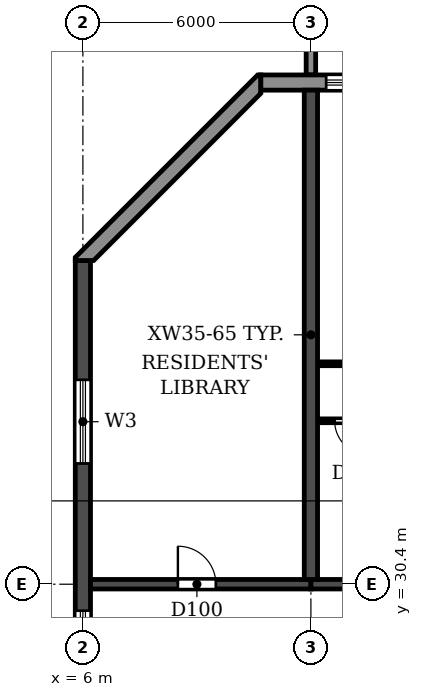
"""IFC4 building model, lengths in metres.
Left out: names, types, materials, properties, quantities, classifications, styles, units other than length and angle.
Written with IfcOpenShell. Run it as: python <this file> out.ifc"""

import sys

from ifc_helpers import new_model, si_unit, direction, frame, frame_2d, origin, place, context, subcontext, project, spatial, polyline, rectangle, outline, extrude, source, transform, mapped, element, fill, save


model = new_model("IFC4")
c1 = context("Model", 3, precision=1e-05, world=origin(), true_north=direction((0.0, 1.0)))
c2 = subcontext(c1, "Body", "Model", "MODEL_VIEW")
j1 = project(units=[si_unit("LENGTHUNIT", "METRE"), si_unit("PLANEANGLEUNIT", "RADIAN")], contexts=[c1])
p1 = place(None, origin())
s1 = spatial("IfcSite", under=j1, at=p1, CompositionType="ELEMENT")
p2 = place(p1, origin())
s2 = spatial("IfcBuilding", under=s1, at=p2, CompositionType="ELEMENT")
p3 = place(p2, frame((0.0, 0.0, 92.7)))
s3 = spatial("IfcBuildingStorey", under=s2, at=p3, CompositionType="ELEMENT", Elevation=92.7)
p4 = place(p3, frame((12.0, 30.525, 0.0), z_axis=(0.0, 0.0, 1.0), x_axis=(0.0, 1.0, 0.0)))
e1 = element("IfcWall", 1, at=p4, inside=s3, PredefinedType="SHEAR", context=c2, shape_type="SweptSolid", body=[
    extrude(rectangle(XDim=12.875, YDim=0.35, at=frame_2d((6.438, 0.0))), origin(), (0.0, 0.0, 1.0), 3.06),
])
p5 = place(p3, frame((6.0, 4.683, 0.0), z_axis=(0.0, 0.0, 1.0), x_axis=(0.0, 1.0, 0.0)))
e2 = element("IfcWall", 2, at=p5, inside=s3, PredefinedType="SHEAR", context=c2, shape_type="SweptSolid", body=[
    extrude(rectangle(XDim=34.234, YDim=0.4, at=frame_2d((17.117, 0.0))), origin(), (0.0, 0.0, 1.0), 3.06),
])
p6 = place(p5, frame((23.817, 0.0, 0.9)))
e3 = element("IfcOpeningElement", 3, at=p6, cuts=e2, PredefinedType="OPENING", context=c2, shape_type="SweptSolid", body=[
    extrude(rectangle(XDim=1.2, YDim=1.5, at=frame_2d((0.6, 0.75))), frame((0.0, 0.21, 0.0), z_axis=(0.0, -1.0, 0.0), x_axis=(1.0, 0.0, 0.0)), (0.0, 0.0, 1.0), 0.42),
])
p7 = place(p5, frame((8.017, 0.0, 0.9)))
e4 = element("IfcOpeningElement", 4, at=p7, cuts=e2, PredefinedType="OPENING", context=c2, shape_type="SweptSolid", body=[
    extrude(rectangle(XDim=1.2, YDim=1.5, at=frame_2d((0.6, 0.75))), frame((0.0, 0.21, 0.0), z_axis=(0.0, -1.0, 0.0), x_axis=(1.0, 0.0, 0.0)), (0.0, 0.0, 1.0), 0.42),
])
p8 = place(p5, frame((15.917, 0.0, 0.9)))
e5 = element("IfcOpeningElement", 5, at=p8, cuts=e2, PredefinedType="OPENING", context=c2, shape_type="SweptSolid", body=[
    extrude(rectangle(XDim=1.2, YDim=1.5, at=frame_2d((0.6, 0.75))), frame((0.0, 0.21, 0.0), z_axis=(0.0, -1.0, 0.0), x_axis=(1.0, 0.0, 0.0)), (0.0, 0.0, 1.0), 0.42),
])
p9 = place(p5, frame((28.894, 0.0, 0.6)))
e6 = element("IfcOpeningElement", 6, at=p9, cuts=e2, PredefinedType="OPENING", context=c2, shape_type="SweptSolid", body=[
    extrude(rectangle(XDim=2.2, YDim=1.8, at=frame_2d((1.1, 0.9))), frame((0.0, 0.21, 0.0), z_axis=(0.0, -1.0, 0.0), x_axis=(1.0, 0.0, 0.0)), (0.0, 0.0, 1.0), 0.42),
])
p10 = place(p5, frame((2.541, 0.0, 0.6)))
e7 = element("IfcOpeningElement", 7, at=p10, cuts=e2, PredefinedType="OPENING", context=c2, shape_type="SweptSolid", body=[
    extrude(rectangle(XDim=2.2, YDim=1.8, at=frame_2d((1.1, 0.9))), frame((0.0, 0.21, 0.0), z_axis=(0.0, -1.0, 0.0), x_axis=(1.0, 0.0, 0.0)), (0.0, 0.0, 1.0), 0.42),
])
p11 = place(p3, frame((6.2, 30.4, 0.0), z_axis=(0.0, 0.0, 1.0), x_axis=(1.0, 0.0, 0.0)))
e8 = element("IfcWall", 8, at=p11, inside=s3, PredefinedType="SHEAR", context=c2, shape_type="SweptSolid", body=[
    extrude(rectangle(XDim=5.8, YDim=0.25, at=frame_2d((2.9, 0.0))), origin(), (0.0, 0.0, 1.0), 2.46),
])
p12 = place(p11, frame((2.3, 0.0, 0.0)))
e9 = element("IfcOpeningElement", 9, at=p12, cuts=e8, PredefinedType="OPENING", context=c2, shape_type="SweptSolid", body=[
    extrude(rectangle(XDim=1.0, YDim=2.1, at=frame_2d((0.5, 1.05))), frame((0.0, 0.135, 0.0), z_axis=(0.0, -1.0, 0.0), x_axis=(1.0, 0.0, 0.0)), (0.0, 0.0, 1.0), 0.27),
])
p13 = place(p3, frame((12.0, 30.4, 0.0), z_axis=(0.0, 0.0, 1.0), x_axis=(1.0, 0.0, 0.0)))
e10 = element("IfcWall", 10, at=p13, inside=s3, PredefinedType="SHEAR", context=c2, shape_type="SweptSolid", body=[
    extrude(rectangle(XDim=6.0, YDim=0.25, at=frame_2d((3.0, 0.0))), origin(), (0.0, 0.0, 1.0), 2.46),
])
p14 = place(p13, frame((2.55, 0.0, 0.0)))
e11 = element("IfcOpeningElement", 11, at=p14, cuts=e10, PredefinedType="OPENING", context=c2, shape_type="SweptSolid", body=[
    extrude(rectangle(XDim=1.0, YDim=2.1, at=frame_2d((0.5, 1.05))), frame((0.0, 0.135, 0.0), z_axis=(0.0, -1.0, 0.0), x_axis=(1.0, 0.0, 0.0)), (0.0, 0.0, 1.0), 0.27),
])
p15 = place(p3, frame((91.317, 43.6, 0.0), z_axis=(0.0, 0.0, 1.0), x_axis=(-1.0, 0.0, 0.0)))
e12 = element("IfcWall", 12, at=p15, inside=s3, PredefinedType="STANDARD", context=c2, shape_type="SweptSolid", body=[
    extrude(rectangle(XDim=80.634, YDim=0.4, at=frame_2d((40.317, 0.0))), origin(), (0.0, 0.0, 1.0), 3.06),
])
p16 = place(p15, frame((76.717, 0.0, 0.9)))
e13 = element("IfcOpeningElement", 13, at=p16, cuts=e12, PredefinedType="OPENING", context=c2, shape_type="SweptSolid", body=[
    extrude(rectangle(XDim=2.2, YDim=1.5, at=frame_2d((1.1, 0.75))), frame((0.0, 0.21, 0.0), z_axis=(0.0, -1.0, 0.0), x_axis=(1.0, 0.0, 0.0)), (0.0, 0.0, 1.0), 0.42),
])
p17 = place(p15, frame((73.917, 0.0, 0.0)))
e14 = element("IfcOpeningElement", 14, at=p17, cuts=e12, PredefinedType="OPENING", context=c2, shape_type="SweptSolid", body=[
    extrude(rectangle(XDim=1.8, YDim=2.4, at=frame_2d((0.9, 1.2))), frame((0.0, 0.21, 0.0), z_axis=(0.0, -1.0, 0.0), x_axis=(1.0, 0.0, 0.0)), (0.0, 0.0, 1.0), 0.42),
])
p18 = place(p15, frame((70.717, 0.0, 0.9)))
e15 = element("IfcOpeningElement", 15, at=p18, cuts=e12, PredefinedType="OPENING", context=c2, shape_type="SweptSolid", body=[
    extrude(rectangle(XDim=2.2, YDim=1.5, at=frame_2d((1.1, 0.75))), frame((0.0, 0.21, 0.0), z_axis=(0.0, -1.0, 0.0), x_axis=(1.0, 0.0, 0.0)), (0.0, 0.0, 1.0), 0.42),
])
p19 = place(p15, frame((67.717, 0.0, 0.9)))
e16 = element("IfcOpeningElement", 16, at=p19, cuts=e12, PredefinedType="OPENING", context=c2, shape_type="SweptSolid", body=[
    extrude(rectangle(XDim=2.2, YDim=1.5, at=frame_2d((1.1, 0.75))), frame((0.0, 0.21, 0.0), z_axis=(0.0, -1.0, 0.0), x_axis=(1.0, 0.0, 0.0)), (0.0, 0.0, 1.0), 0.42),
])
p20 = place(p15, frame((64.717, 0.0, 0.9)))
e17 = element("IfcOpeningElement", 17, at=p20, cuts=e12, PredefinedType="OPENING", context=c2, shape_type="SweptSolid", body=[
    extrude(rectangle(XDim=2.2, YDim=1.5, at=frame_2d((1.1, 0.75))), frame((0.0, 0.21, 0.0), z_axis=(0.0, -1.0, 0.0), x_axis=(1.0, 0.0, 0.0)), (0.0, 0.0, 1.0), 0.42),
])
p21 = place(p15, frame((61.917, 0.0, 0.0)))
e18 = element("IfcOpeningElement", 18, at=p21, cuts=e12, PredefinedType="OPENING", context=c2, shape_type="SweptSolid", body=[
    extrude(rectangle(XDim=1.8, YDim=2.4, at=frame_2d((0.9, 1.2))), frame((0.0, 0.21, 0.0), z_axis=(0.0, -1.0, 0.0), x_axis=(1.0, 0.0, 0.0)), (0.0, 0.0, 1.0), 0.42),
])
p22 = place(p15, frame((58.717, 0.0, 0.9)))
e19 = element("IfcOpeningElement", 19, at=p22, cuts=e12, PredefinedType="OPENING", context=c2, shape_type="SweptSolid", body=[
    extrude(rectangle(XDim=2.2, YDim=1.5, at=frame_2d((1.1, 0.75))), frame((0.0, 0.21, 0.0), z_axis=(0.0, -1.0, 0.0), x_axis=(1.0, 0.0, 0.0)), (0.0, 0.0, 1.0), 0.42),
])
p23 = place(p15, frame((55.717, 0.0, 0.9)))
e20 = element("IfcOpeningElement", 20, at=p23, cuts=e12, PredefinedType="OPENING", context=c2, shape_type="SweptSolid", body=[
    extrude(rectangle(XDim=2.2, YDim=1.5, at=frame_2d((1.1, 0.75))), frame((0.0, 0.21, 0.0), z_axis=(0.0, -1.0, 0.0), x_axis=(1.0, 0.0, 0.0)), (0.0, 0.0, 1.0), 0.42),
])
p24 = place(p15, frame((52.917, 0.0, 0.0)))
e21 = element("IfcOpeningElement", 21, at=p24, cuts=e12, PredefinedType="OPENING", context=c2, shape_type="SweptSolid", body=[
    extrude(rectangle(XDim=1.8, YDim=2.4, at=frame_2d((0.9, 1.2))), frame((0.0, 0.21, 0.0), z_axis=(0.0, -1.0, 0.0), x_axis=(1.0, 0.0, 0.0)), (0.0, 0.0, 1.0), 0.42),
])
p25 = place(p15, frame((49.717, 0.0, 0.9)))
e22 = element("IfcOpeningElement", 22, at=p25, cuts=e12, PredefinedType="OPENING", context=c2, shape_type="SweptSolid", body=[
    extrude(rectangle(XDim=2.2, YDim=1.5, at=frame_2d((1.1, 0.75))), frame((0.0, 0.21, 0.0), z_axis=(0.0, -1.0, 0.0), x_axis=(1.0, 0.0, 0.0)), (0.0, 0.0, 1.0), 0.42),
])
p26 = place(p15, frame((46.717, 0.0, 0.9)))
e23 = element("IfcOpeningElement", 23, at=p26, cuts=e12, PredefinedType="OPENING", context=c2, shape_type="SweptSolid", body=[
    extrude(rectangle(XDim=2.2, YDim=1.5, at=frame_2d((1.1, 0.75))), frame((0.0, 0.21, 0.0), z_axis=(0.0, -1.0, 0.0), x_axis=(1.0, 0.0, 0.0)), (0.0, 0.0, 1.0), 0.42),
])
p27 = place(p15, frame((43.717, 0.0, 0.9)))
e24 = element("IfcOpeningElement", 24, at=p27, cuts=e12, PredefinedType="OPENING", context=c2, shape_type="SweptSolid", body=[
    extrude(rectangle(XDim=2.2, YDim=1.5, at=frame_2d((1.1, 0.75))), frame((0.0, 0.21, 0.0), z_axis=(0.0, -1.0, 0.0), x_axis=(1.0, 0.0, 0.0)), (0.0, 0.0, 1.0), 0.42),
])
p28 = place(p15, frame((40.717, 0.0, 0.9)))
e25 = element("IfcOpeningElement", 25, at=p28, cuts=e12, PredefinedType="OPENING", context=c2, shape_type="SweptSolid", body=[
    extrude(rectangle(XDim=2.2, YDim=1.5, at=frame_2d((1.1, 0.75))), frame((0.0, 0.21, 0.0), z_axis=(0.0, -1.0, 0.0), x_axis=(1.0, 0.0, 0.0)), (0.0, 0.0, 1.0), 0.42),
])
p29 = place(p15, frame((37.917, 0.0, 0.0)))
e26 = element("IfcOpeningElement", 26, at=p29, cuts=e12, PredefinedType="OPENING", context=c2, shape_type="SweptSolid", body=[
    extrude(rectangle(XDim=1.8, YDim=2.4, at=frame_2d((0.9, 1.2))), frame((0.0, 0.21, 0.0), z_axis=(0.0, -1.0, 0.0), x_axis=(1.0, 0.0, 0.0)), (0.0, 0.0, 1.0), 0.42),
])
p30 = place(p15, frame((34.917, 0.0, 0.0)))
e27 = element("IfcOpeningElement", 27, at=p30, cuts=e12, PredefinedType="OPENING", context=c2, shape_type="SweptSolid", body=[
    extrude(rectangle(XDim=1.8, YDim=2.4, at=frame_2d((0.9, 1.2))), frame((0.0, 0.21, 0.0), z_axis=(0.0, -1.0, 0.0), x_axis=(1.0, 0.0, 0.0)), (0.0, 0.0, 1.0), 0.42),
])
p31 = place(p15, frame((31.717, 0.0, 0.9)))
e28 = element("IfcOpeningElement", 28, at=p31, cuts=e12, PredefinedType="OPENING", context=c2, shape_type="SweptSolid", body=[
    extrude(rectangle(XDim=2.2, YDim=1.5, at=frame_2d((1.1, 0.75))), frame((0.0, 0.21, 0.0), z_axis=(0.0, -1.0, 0.0), x_axis=(1.0, 0.0, 0.0)), (0.0, 0.0, 1.0), 0.42),
])
p32 = place(p15, frame((28.717, 0.0, 0.9)))
e29 = element("IfcOpeningElement", 29, at=p32, cuts=e12, PredefinedType="OPENING", context=c2, shape_type="SweptSolid", body=[
    extrude(rectangle(XDim=2.2, YDim=1.5, at=frame_2d((1.1, 0.75))), frame((0.0, 0.21, 0.0), z_axis=(0.0, -1.0, 0.0), x_axis=(1.0, 0.0, 0.0)), (0.0, 0.0, 1.0), 0.42),
])
p33 = place(p15, frame((25.717, 0.0, 0.9)))
e30 = element("IfcOpeningElement", 30, at=p33, cuts=e12, PredefinedType="OPENING", context=c2, shape_type="SweptSolid", body=[
    extrude(rectangle(XDim=2.2, YDim=1.5, at=frame_2d((1.1, 0.75))), frame((0.0, 0.21, 0.0), z_axis=(0.0, -1.0, 0.0), x_axis=(1.0, 0.0, 0.0)), (0.0, 0.0, 1.0), 0.42),
])
p34 = place(p15, frame((22.717, 0.0, 0.9)))
e31 = element("IfcOpeningElement", 31, at=p34, cuts=e12, PredefinedType="OPENING", context=c2, shape_type="SweptSolid", body=[
    extrude(rectangle(XDim=2.2, YDim=1.5, at=frame_2d((1.1, 0.75))), frame((0.0, 0.21, 0.0), z_axis=(0.0, -1.0, 0.0), x_axis=(1.0, 0.0, 0.0)), (0.0, 0.0, 1.0), 0.42),
])
p35 = place(p15, frame((19.917, 0.0, 0.0)))
e32 = element("IfcOpeningElement", 32, at=p35, cuts=e12, PredefinedType="OPENING", context=c2, shape_type="SweptSolid", body=[
    extrude(rectangle(XDim=1.8, YDim=2.4, at=frame_2d((0.9, 1.2))), frame((0.0, 0.21, 0.0), z_axis=(0.0, -1.0, 0.0), x_axis=(1.0, 0.0, 0.0)), (0.0, 0.0, 1.0), 0.42),
])
p36 = place(p15, frame((16.717, 0.0, 0.9)))
e33 = element("IfcOpeningElement", 33, at=p36, cuts=e12, PredefinedType="OPENING", context=c2, shape_type="SweptSolid", body=[
    extrude(rectangle(XDim=2.2, YDim=1.5, at=frame_2d((1.1, 0.75))), frame((0.0, 0.21, 0.0), z_axis=(0.0, -1.0, 0.0), x_axis=(1.0, 0.0, 0.0)), (0.0, 0.0, 1.0), 0.42),
])
p37 = place(p15, frame((13.917, 0.0, 0.0)))
e34 = element("IfcOpeningElement", 34, at=p37, cuts=e12, PredefinedType="OPENING", context=c2, shape_type="SweptSolid", body=[
    extrude(rectangle(XDim=1.8, YDim=2.4, at=frame_2d((0.9, 1.2))), frame((0.0, 0.21, 0.0), z_axis=(0.0, -1.0, 0.0), x_axis=(1.0, 0.0, 0.0)), (0.0, 0.0, 1.0), 0.42),
])
p38 = place(p15, frame((10.717, 0.0, 0.9)))
e35 = element("IfcOpeningElement", 35, at=p38, cuts=e12, PredefinedType="OPENING", context=c2, shape_type="SweptSolid", body=[
    extrude(rectangle(XDim=2.2, YDim=1.5, at=frame_2d((1.1, 0.75))), frame((0.0, 0.21, 0.0), z_axis=(0.0, -1.0, 0.0), x_axis=(1.0, 0.0, 0.0)), (0.0, 0.0, 1.0), 0.42),
])
p39 = place(p15, frame((7.917, 0.0, 0.0)))
e36 = element("IfcOpeningElement", 36, at=p39, cuts=e12, PredefinedType="OPENING", context=c2, shape_type="SweptSolid", body=[
    extrude(rectangle(XDim=1.8, YDim=2.4, at=frame_2d((0.9, 1.2))), frame((0.0, 0.21, 0.0), z_axis=(0.0, -1.0, 0.0), x_axis=(1.0, 0.0, 0.0)), (0.0, 0.0, 1.0), 0.42),
])
p40 = place(p15, frame((4.717, 0.0, 0.9)))
e37 = element("IfcOpeningElement", 37, at=p40, cuts=e12, PredefinedType="OPENING", context=c2, shape_type="SweptSolid", body=[
    extrude(rectangle(XDim=2.2, YDim=1.5, at=frame_2d((1.1, 0.75))), frame((0.0, 0.21, 0.0), z_axis=(0.0, -1.0, 0.0), x_axis=(1.0, 0.0, 0.0)), (0.0, 0.0, 1.0), 0.42),
])
p41 = place(p15, frame((1.917, 0.0, 0.0)))
e38 = element("IfcOpeningElement", 38, at=p41, cuts=e12, PredefinedType="OPENING", context=c2, shape_type="SweptSolid", body=[
    extrude(rectangle(XDim=1.8, YDim=2.4, at=frame_2d((0.9, 1.2))), frame((0.0, 0.21, 0.0), z_axis=(0.0, -1.0, 0.0), x_axis=(1.0, 0.0, 0.0)), (0.0, 0.0, 1.0), 0.42),
])
p42 = place(p3, origin())
e39 = element("IfcWall", 39, at=p42, inside=s3, PredefinedType="STANDARD", context=c2, shape_type="SweptSolid", body=[
    extrude(outline(polyline([(10.683, 43.8), (10.6, 43.8), (5.8, 39.0), (5.8, 38.917), (6.283, 38.917), (10.683, 43.317), (10.683, 43.8)])), origin(), (0.0, 0.0, 1.0), 3.06),
])
m1 = source(origin(), c2, "Body", "SweptSolid", [
    extrude(outline(polyline([(0.0, 0.0), (0.25, 0.0), (0.25, 3.1), (0.0, 3.1), (0.0, 0.0)])), origin(), (0.0, 0.0, 1.0), 3.1),
])
p43 = place(p3, frame((11.875, 43.8, 0.0)))
e40 = element("IfcWall", 40, at=p43, inside=s3, PredefinedType="STANDARD", context=c2, shape_type="MappedRepresentation", body=[
    mapped(m1, transform((0.0, 0.0, 0.0))),
])
p44 = place(p3, frame((12.185, 34.7, 0.0), z_axis=(0.0, 0.0, 1.0), x_axis=(1.0, 0.0, 0.0)))
e41 = element("IfcWall", 41, at=p44, inside=s3, PredefinedType="PARTITIONING", context=c2, shape_type="SweptSolid", body=[
    extrude(rectangle(XDim=2.015, YDim=0.1, at=frame_2d((1.007, 0.0))), origin(), (0.0, 0.0, 1.0), 3.06),
])
p45 = place(p44, frame((0.44, 0.0, 0.0)))
e42 = element("IfcOpeningElement", 42, at=p45, cuts=e41, PredefinedType="OPENING", context=c2, shape_type="SweptSolid", body=[
    extrude(rectangle(XDim=0.9, YDim=2.1, at=frame_2d((0.45, 1.05))), frame((0.0, 0.06, 0.0), z_axis=(0.0, -1.0, 0.0), x_axis=(1.0, 0.0, 0.0)), (0.0, 0.0, 1.0), 0.12),
])
p46 = place(p3, frame((12.185, 36.2, 0.0), z_axis=(0.0, 0.0, 1.0), x_axis=(1.0, 0.0, 0.0)))
e43 = element("IfcWall", 43, at=p46, inside=s3, PredefinedType="PARTITIONING", context=c2, shape_type="SweptSolid", body=[
    extrude(rectangle(XDim=2.865, YDim=0.1, at=frame_2d((1.433, 0.0))), origin(), (0.0, 0.0, 1.0), 3.06),
])
p47 = place(p46, frame((1.415, 0.0, 0.0)))
e44 = element("IfcOpeningElement", 44, at=p47, cuts=e43, PredefinedType="OPENING", context=c2, shape_type="SweptSolid", body=[
    extrude(rectangle(XDim=0.9, YDim=2.1, at=frame_2d((0.45, 1.05))), frame((0.0, 0.06, 0.0), z_axis=(0.0, -1.0, 0.0), x_axis=(1.0, 0.0, 0.0)), (0.0, 0.0, 1.0), 0.12),
])
p48 = place(p16, origin())
e45 = element("IfcWindow", 45, at=p48, inside=s3, PartitioningType="DOUBLE_PANEL_HORIZONTAL", PredefinedType="WINDOW", context=c2, shape_type="SweptSolid", body=[
    extrude(rectangle(XDim=2.2, YDim=1.5, at=frame_2d((1.1, 0.75))), frame((0.0, 0.03, 0.0), z_axis=(0.0, -1.0, 0.0), x_axis=(1.0, 0.0, 0.0)), (0.0, 0.0, 1.0), 0.06),
])
fill(e13, e45)
p49 = place(p6, origin())
e46 = element("IfcWindow", 46, at=p49, inside=s3, PartitioningType="SINGLE_PANEL", PredefinedType="WINDOW", context=c2, shape_type="SweptSolid", body=[
    extrude(rectangle(XDim=1.2, YDim=1.5, at=frame_2d((0.6, 0.75))), frame((0.0, 0.03, 0.0), z_axis=(0.0, -1.0, 0.0), x_axis=(1.0, 0.0, 0.0)), (0.0, 0.0, 1.0), 0.06),
])
fill(e3, e46)
p50 = place(p9, origin())
e47 = element("IfcWindow", 47, at=p50, inside=s3, PartitioningType="DOUBLE_PANEL_HORIZONTAL", PredefinedType="WINDOW", context=c2, shape_type="SweptSolid", body=[
    extrude(rectangle(XDim=2.2, YDim=1.8, at=frame_2d((1.1, 0.9))), frame((0.0, 0.03, 0.0), z_axis=(0.0, -1.0, 0.0), x_axis=(1.0, 0.0, 0.0)), (0.0, 0.0, 1.0), 0.06),
])
fill(e6, e47)
p51 = place(p12, origin())
e48 = element("IfcDoor", 48, at=p51, inside=s3, OperationType="SINGLE_SWING_LEFT", PredefinedType="DOOR", context=c2, shape_type="SweptSolid", body=[
    extrude(rectangle(XDim=1.0, YDim=2.1, at=frame_2d((0.5, 1.05))), frame((0.0, 0.025, 0.0), z_axis=(0.0, -1.0, 0.0), x_axis=(1.0, 0.0, 0.0)), (0.0, 0.0, 1.0), 0.05),
])
fill(e9, e48)
p52 = place(p45, frame((0.9, 0.0, 0.0), z_axis=(0.0, 0.0, 1.0), x_axis=(-1.0, 0.0, 0.0)))
e49 = element("IfcDoor", 49, at=p52, inside=s3, OperationType="SINGLE_SWING_LEFT", PredefinedType="DOOR", context=c2, shape_type="SweptSolid", body=[
    extrude(rectangle(XDim=0.9, YDim=2.1, at=frame_2d((0.45, 1.05))), frame((0.0, 0.025, 0.0), z_axis=(0.0, -1.0, 0.0), x_axis=(1.0, 0.0, 0.0)), (0.0, 0.0, 1.0), 0.05),
])
fill(e42, e49)
save(model, sys.argv[1])
